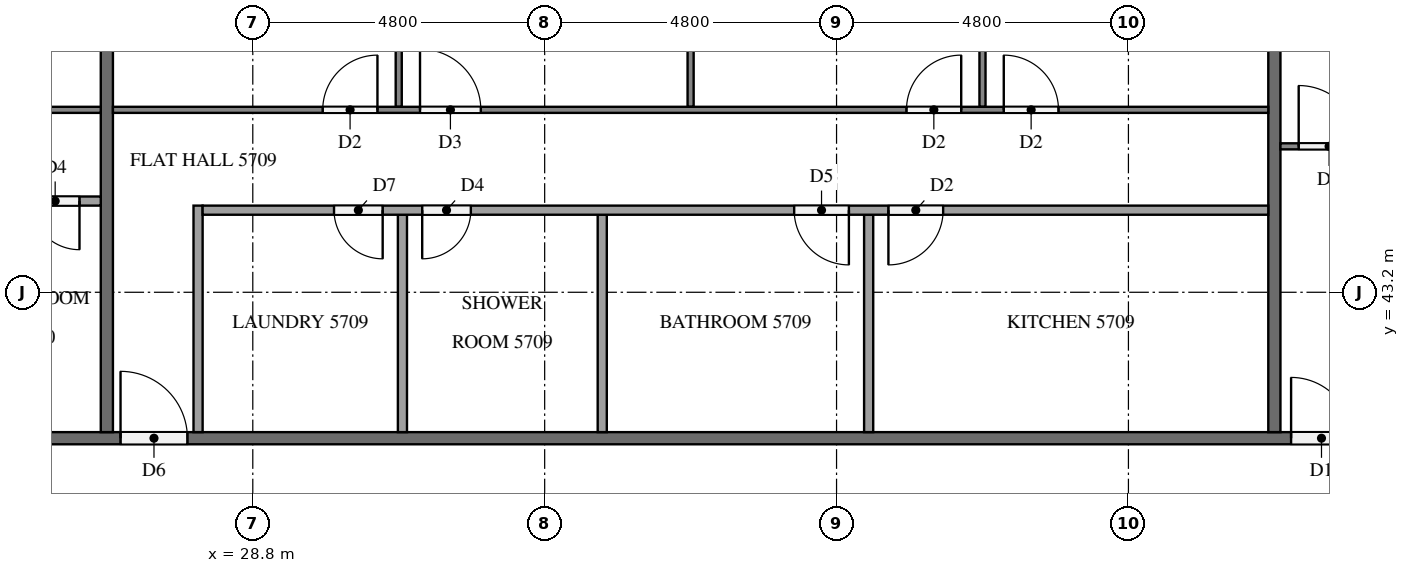
"""IFC4 building model, lengths in metres.
Left out: names, types, materials, properties, quantities, classifications, styles, units other than length and angle.
Written with IfcOpenShell. Run it as: python <this file> out.ifc"""

import sys

from ifc_helpers import new_model, si_unit, direction, frame, frame_2d, origin, place, context, subcontext, project, spatial, rectangle, extrude, element, fill, save


model = new_model("IFC4")
c1 = context("Model", 3, precision=1e-05, world=origin(), true_north=direction((0.0, 1.0)))
c2 = subcontext(c1, "Body", "Model", "MODEL_VIEW")
j1 = project(units=[si_unit("LENGTHUNIT", "METRE"), si_unit("PLANEANGLEUNIT", "RADIAN")], contexts=[c1])
p1 = place(None, origin())
s1 = spatial("IfcSite", under=j1, at=p1, CompositionType="ELEMENT")
p2 = place(p1, origin())
s2 = spatial("IfcBuilding", under=s1, at=p2, CompositionType="ELEMENT")
p3 = place(p2, frame((0.0, 0.0, 219.3)))
s3 = spatial("IfcBuildingStorey", under=s2, at=p3, CompositionType="ELEMENT", Elevation=219.3)
p4 = place(p3, frame((11.9, 40.8, 0.0), z_axis=(0.0, 0.0, 1.0), x_axis=(1.0, 0.0, 0.0)))
e1 = element("IfcWall", 1, at=p4, inside=s3, PredefinedType="PARTITIONING", context=c2, shape_type="SweptSolid", body=[
    extrude(rectangle(XDim=38.6, YDim=0.2, at=frame_2d((19.3, 0.0))), origin(), (0.0, 0.0, 1.0), 3.2),
])
p5 = place(p4, frame((33.975, 0.0, 0.0)))
e2 = element("IfcOpeningElement", 2, at=p5, cuts=e1, PredefinedType="OPENING", context=c2, shape_type="SweptSolid", body=[
    extrude(rectangle(XDim=1.0, YDim=2.1, at=frame_2d((0.5, 1.05))), frame((0.0, 0.11, 0.0), z_axis=(0.0, -1.0, 0.0), x_axis=(1.0, 0.0, 0.0)), (0.0, 0.0, 1.0), 0.22),
])
p6 = place(p4, frame((14.725, 0.0, 0.0)))
e3 = element("IfcOpeningElement", 3, at=p6, cuts=e1, PredefinedType="OPENING", context=c2, shape_type="SweptSolid", body=[
    extrude(rectangle(XDim=1.1, YDim=2.1, at=frame_2d((0.55, 1.05))), frame((0.0, 0.11, 0.0), z_axis=(0.0, -1.0, 0.0), x_axis=(1.0, 0.0, 0.0)), (0.0, 0.0, 1.0), 0.22),
])
p7 = place(p4, frame((7.575, 0.0, 0.0)))
e4 = element("IfcOpeningElement", 4, at=p7, cuts=e1, PredefinedType="OPENING", context=c2, shape_type="SweptSolid", body=[
    extrude(rectangle(XDim=1.0, YDim=2.1, at=frame_2d((0.5, 1.05))), frame((0.0, 0.11, 0.0), z_axis=(0.0, -1.0, 0.0), x_axis=(1.0, 0.0, 0.0)), (0.0, 0.0, 1.0), 0.22),
])
p8 = place(p4, frame((6.025, 0.0, 0.0)))
e5 = element("IfcOpeningElement", 5, at=p8, cuts=e1, PredefinedType="OPENING", context=c2, shape_type="SweptSolid", body=[
    extrude(rectangle(XDim=1.0, YDim=2.1, at=frame_2d((0.5, 1.05))), frame((0.0, 0.11, 0.0), z_axis=(0.0, -1.0, 0.0), x_axis=(1.0, 0.0, 0.0)), (0.0, 0.0, 1.0), 0.22),
])
for number, where, z_axis, x_axis in (
    (6, (45.6, 52.7, 0.0), (0.0, 0.0, 1.0), (0.0, -1.0, 0.0)),
    (7, (26.4, 52.7, 0.0), (0.0, 0.0, 1.0), (0.0, -1.0, 0.0)),
):
    element("IfcWall", number, at=place(p3, frame(where, z_axis=z_axis, x_axis=x_axis)), inside=s3, PredefinedType="PARTITIONING", context=c2, shape_type="SweptSolid", body=[
        extrude(rectangle(XDim=11.8, YDim=0.2, at=frame_2d((5.9, 0.0))), origin(), (0.0, 0.0, 1.0), 3.2),
    ])
p9 = place(p3, frame((45.7, 45.6, 0.0), z_axis=(0.0, 0.0, 1.0), x_axis=(1.0, 0.0, 0.0)))
e8 = element("IfcWall", 8, at=p9, inside=s3, PredefinedType="PARTITIONING", context=c2, shape_type="SweptSolid", body=[
    extrude(rectangle(XDim=16.6, YDim=0.1, at=frame_2d((8.3, 0.0))), origin(), (0.0, 0.0, 1.0), 3.2),
])
p10 = place(p9, frame((0.3, 0.0, 0.0)))
e9 = element("IfcOpeningElement", 9, at=p10, cuts=e8, PredefinedType="OPENING", context=c2, shape_type="SweptSolid", body=[
    extrude(rectangle(XDim=1.0, YDim=2.1, at=frame_2d((0.5, 1.05))), frame((0.0, 0.06, 0.0), z_axis=(0.0, -1.0, 0.0), x_axis=(1.0, 0.0, 0.0)), (0.0, 0.0, 1.0), 0.12),
])
p11 = place(p9, frame((10.65, 0.0, 0.0)))
e10 = element("IfcOpeningElement", 10, at=p11, cuts=e8, PredefinedType="OPENING", context=c2, shape_type="SweptSolid", body=[
    extrude(rectangle(XDim=0.9, YDim=2.1, at=frame_2d((0.45, 1.05))), frame((0.0, 0.06, 0.0), z_axis=(0.0, -1.0, 0.0), x_axis=(1.0, 0.0, 0.0)), (0.0, 0.0, 1.0), 0.12),
])
p12 = place(p9, frame((12.25, 0.0, 0.0)))
e11 = element("IfcOpeningElement", 11, at=p12, cuts=e8, PredefinedType="OPENING", context=c2, shape_type="SweptSolid", body=[
    extrude(rectangle(XDim=0.9, YDim=2.1, at=frame_2d((0.45, 1.05))), frame((0.0, 0.06, 0.0), z_axis=(0.0, -1.0, 0.0), x_axis=(1.0, 0.0, 0.0)), (0.0, 0.0, 1.0), 0.12),
])
for number, where, z_axis, x_axis in (
    (12, (31.2, 46.25, 0.0), (0.0, 0.0, 1.0), (0.0, 1.0, 0.0)),
    (13, (36.0, 46.25, 0.0), (0.0, 0.0, 1.0), (0.0, 1.0, 0.0)),
    (14, (40.8, 46.25, 0.0), (0.0, 0.0, 1.0), (0.0, 1.0, 0.0)),
):
    element("IfcWall", number, at=place(p3, frame(where, z_axis=z_axis, x_axis=x_axis)), inside=s3, PredefinedType="PARTITIONING", context=c2, shape_type="SweptSolid", body=[
        extrude(rectangle(XDim=6.45, YDim=0.1, at=frame_2d((3.225, 0.0))), origin(), (0.0, 0.0, 1.0), 3.2),
    ])
p13 = place(p3, frame((26.5, 46.2, 0.0), z_axis=(0.0, 0.0, 1.0), x_axis=(1.0, 0.0, 0.0)))
e15 = element("IfcWall", 15, at=p13, inside=s3, PredefinedType="PARTITIONING", context=c2, shape_type="SweptSolid", body=[
    extrude(rectangle(XDim=19.0, YDim=0.1, at=frame_2d((9.5, 0.0))), origin(), (0.0, 0.0, 1.0), 3.2),
])
p14 = place(p13, frame((3.45, 0.0, 0.0)))
e16 = element("IfcOpeningElement", 16, at=p14, cuts=e15, PredefinedType="OPENING", context=c2, shape_type="SweptSolid", body=[
    extrude(rectangle(XDim=0.9, YDim=2.1, at=frame_2d((0.45, 1.05))), frame((0.0, 0.06, 0.0), z_axis=(0.0, -1.0, 0.0), x_axis=(1.0, 0.0, 0.0)), (0.0, 0.0, 1.0), 0.12),
])
p15 = place(p13, frame((5.05, 0.0, 0.0)))
e17 = element("IfcOpeningElement", 17, at=p15, cuts=e15, PredefinedType="OPENING", context=c2, shape_type="SweptSolid", body=[
    extrude(rectangle(XDim=1.0, YDim=2.1, at=frame_2d((0.5, 1.05))), frame((0.0, 0.06, 0.0), z_axis=(0.0, -1.0, 0.0), x_axis=(1.0, 0.0, 0.0)), (0.0, 0.0, 1.0), 0.12),
])
p16 = place(p13, frame((13.05, 0.0, 0.0)))
e18 = element("IfcOpeningElement", 18, at=p16, cuts=e15, PredefinedType="OPENING", context=c2, shape_type="SweptSolid", body=[
    extrude(rectangle(XDim=0.9, YDim=2.1, at=frame_2d((0.45, 1.05))), frame((0.0, 0.06, 0.0), z_axis=(0.0, -1.0, 0.0), x_axis=(1.0, 0.0, 0.0)), (0.0, 0.0, 1.0), 0.12),
])
p17 = place(p13, frame((14.65, 0.0, 0.0)))
e19 = element("IfcOpeningElement", 19, at=p17, cuts=e15, PredefinedType="OPENING", context=c2, shape_type="SweptSolid", body=[
    extrude(rectangle(XDim=0.9, YDim=2.1, at=frame_2d((0.45, 1.05))), frame((0.0, 0.06, 0.0), z_axis=(0.0, -1.0, 0.0), x_axis=(1.0, 0.0, 0.0)), (0.0, 0.0, 1.0), 0.12),
])
for number, where, z_axis, x_axis in (
    (20, (31.261, 40.9, 0.0), (0.0, 0.0, 1.0), (0.0, 1.0, 0.0)),
    (21, (34.547, 40.9, 0.0), (0.0, 0.0, 1.0), (0.0, 1.0, 0.0)),
    (22, (38.928, 40.9, 0.0), (0.0, 0.0, 1.0), (0.0, 1.0, 0.0)),
):
    element("IfcWall", number, at=place(p3, frame(where, z_axis=z_axis, x_axis=x_axis)), inside=s3, PredefinedType="PARTITIONING", context=c2, shape_type="SweptSolid", body=[
        extrude(rectangle(XDim=3.575, YDim=0.15, at=frame_2d((1.788, 0.0))), origin(), (0.0, 0.0, 1.0), 3.2),
    ])
p18 = place(p3, frame((27.9, 40.9, 0.0), z_axis=(0.0, 0.0, 1.0), x_axis=(0.0, 1.0, 0.0)))
e23 = element("IfcWall", 23, at=p18, inside=s3, PredefinedType="PARTITIONING", context=c2, shape_type="SweptSolid", body=[
    extrude(rectangle(XDim=3.725, YDim=0.15, at=frame_2d((1.863, 0.0))), origin(), (0.0, 0.0, 1.0), 3.2),
])
p19 = place(p3, frame((45.5, 44.55, 0.0), z_axis=(0.0, 0.0, 1.0), x_axis=(-1.0, 0.0, 0.0)))
e24 = element("IfcWall", 24, at=p19, inside=s3, PredefinedType="PARTITIONING", context=c2, shape_type="SweptSolid", body=[
    extrude(rectangle(XDim=17.525, YDim=0.15, at=frame_2d((8.762, 0.0))), origin(), (0.0, 0.0, 1.0), 3.2),
])
p20 = place(p19, frame((14.564, 0.0, 0.0)))
e25 = element("IfcOpeningElement", 25, at=p20, cuts=e24, PredefinedType="OPENING", context=c2, shape_type="SweptSolid", body=[
    extrude(rectangle(XDim=0.8, YDim=2.1, at=frame_2d((0.4, 1.05))), frame((0.0, 0.085, 0.0), z_axis=(0.0, -1.0, 0.0), x_axis=(1.0, 0.0, 0.0)), (0.0, 0.0, 1.0), 0.17),
])
p21 = place(p19, frame((13.114, 0.0, 0.0)))
e26 = element("IfcOpeningElement", 26, at=p21, cuts=e24, PredefinedType="OPENING", context=c2, shape_type="SweptSolid", body=[
    extrude(rectangle(XDim=0.8, YDim=2.1, at=frame_2d((0.4, 1.05))), frame((0.0, 0.085, 0.0), z_axis=(0.0, -1.0, 0.0), x_axis=(1.0, 0.0, 0.0)), (0.0, 0.0, 1.0), 0.17),
])
p22 = place(p19, frame((6.897, 0.0, 0.0)))
e27 = element("IfcOpeningElement", 27, at=p22, cuts=e24, PredefinedType="OPENING", context=c2, shape_type="SweptSolid", body=[
    extrude(rectangle(XDim=0.9, YDim=2.1, at=frame_2d((0.45, 1.05))), frame((0.0, 0.085, 0.0), z_axis=(0.0, -1.0, 0.0), x_axis=(1.0, 0.0, 0.0)), (0.0, 0.0, 1.0), 0.17),
])
p23 = place(p19, frame((5.347, 0.0, 0.0)))
e28 = element("IfcOpeningElement", 28, at=p23, cuts=e24, PredefinedType="OPENING", context=c2, shape_type="SweptSolid", body=[
    extrude(rectangle(XDim=0.9, YDim=2.1, at=frame_2d((0.45, 1.05))), frame((0.0, 0.085, 0.0), z_axis=(0.0, -1.0, 0.0), x_axis=(1.0, 0.0, 0.0)), (0.0, 0.0, 1.0), 0.17),
])
p24 = place(p3, frame((19.3, 46.2, 0.0), z_axis=(0.0, 0.0, 1.0), x_axis=(1.0, 0.0, 0.0)))
e29 = element("IfcWall", 29, at=p24, inside=s3, PredefinedType="PARTITIONING", context=c2, shape_type="SweptSolid", body=[
    extrude(rectangle(XDim=7.0, YDim=0.1, at=frame_2d((3.5, 0.0))), origin(), (0.0, 0.0, 1.0), 3.2),
])
p25 = place(p24, frame((0.3, 0.0, 0.0)))
e30 = element("IfcOpeningElement", 30, at=p25, cuts=e29, PredefinedType="OPENING", context=c2, shape_type="SweptSolid", body=[
    extrude(rectangle(XDim=1.0, YDim=2.1, at=frame_2d((0.5, 1.05))), frame((0.0, 0.06, 0.0), z_axis=(0.0, -1.0, 0.0), x_axis=(1.0, 0.0, 0.0)), (0.0, 0.0, 1.0), 0.12),
])
p26 = place(p3, frame((26.3, 44.7, 0.0), z_axis=(0.0, 0.0, 1.0), x_axis=(-1.0, 0.0, 0.0)))
e31 = element("IfcWall", 31, at=p26, inside=s3, PredefinedType="PARTITIONING", context=c2, shape_type="SweptSolid", body=[
    extrude(rectangle(XDim=5.525, YDim=0.15, at=frame_2d((2.763, 0.0))), origin(), (0.0, 0.0, 1.0), 3.2),
])
p27 = place(p26, frame((4.325, 0.0, 0.0)))
e32 = element("IfcOpeningElement", 32, at=p27, cuts=e31, PredefinedType="OPENING", context=c2, shape_type="SweptSolid", body=[
    extrude(rectangle(XDim=0.9, YDim=2.1, at=frame_2d((0.45, 1.05))), frame((0.0, 0.085, 0.0), z_axis=(0.0, -1.0, 0.0), x_axis=(1.0, 0.0, 0.0)), (0.0, 0.0, 1.0), 0.17),
])
p28 = place(p26, frame((0.35, 0.0, 0.0)))
e33 = element("IfcOpeningElement", 33, at=p28, cuts=e31, PredefinedType="OPENING", context=c2, shape_type="SweptSolid", body=[
    extrude(rectangle(XDim=0.8, YDim=2.1, at=frame_2d((0.4, 1.05))), frame((0.0, 0.085, 0.0), z_axis=(0.0, -1.0, 0.0), x_axis=(1.0, 0.0, 0.0)), (0.0, 0.0, 1.0), 0.17),
])
p29 = place(p5, origin())
e34 = element("IfcDoor", 34, at=p29, inside=s3, OperationType="SINGLE_SWING_LEFT", PredefinedType="DOOR", context=c2, shape_type="SweptSolid", body=[
    extrude(rectangle(XDim=1.0, YDim=2.1, at=frame_2d((0.5, 1.05))), frame((0.0, 0.025, 0.0), z_axis=(0.0, -1.0, 0.0), x_axis=(1.0, 0.0, 0.0)), (0.0, 0.0, 1.0), 0.05),
])
fill(e2, e34)
p30 = place(p6, origin())
e35 = element("IfcDoor", 35, at=p30, inside=s3, OperationType="SINGLE_SWING_LEFT", PredefinedType="DOOR", context=c2, shape_type="SweptSolid", body=[
    extrude(rectangle(XDim=1.1, YDim=2.1, at=frame_2d((0.55, 1.05))), frame((0.0, 0.025, 0.0), z_axis=(0.0, -1.0, 0.0), x_axis=(1.0, 0.0, 0.0)), (0.0, 0.0, 1.0), 0.05),
])
fill(e3, e35)
p31 = place(p10, origin())
e36 = element("IfcDoor", 36, at=p31, inside=s3, OperationType="SINGLE_SWING_LEFT", PredefinedType="DOOR", context=c2, shape_type="SweptSolid", body=[
    extrude(rectangle(XDim=1.0, YDim=2.1, at=frame_2d((0.5, 1.05))), frame((0.0, 0.025, 0.0), z_axis=(0.0, -1.0, 0.0), x_axis=(1.0, 0.0, 0.0)), (0.0, 0.0, 1.0), 0.05),
])
fill(e9, e36)
p32 = place(p14, origin())
e37 = element("IfcDoor", 37, at=p32, inside=s3, OperationType="SINGLE_SWING_RIGHT", PredefinedType="DOOR", context=c2, shape_type="SweptSolid", body=[
    extrude(rectangle(XDim=0.9, YDim=2.1, at=frame_2d((0.45, 1.05))), frame((0.0, 0.025, 0.0), z_axis=(0.0, -1.0, 0.0), x_axis=(1.0, 0.0, 0.0)), (0.0, 0.0, 1.0), 0.05),
])
fill(e16, e37)
p33 = place(p15, origin())
e38 = element("IfcDoor", 38, at=p33, inside=s3, OperationType="SINGLE_SWING_LEFT", PredefinedType="DOOR", context=c2, shape_type="SweptSolid", body=[
    extrude(rectangle(XDim=1.0, YDim=2.1, at=frame_2d((0.5, 1.05))), frame((0.0, 0.025, 0.0), z_axis=(0.0, -1.0, 0.0), x_axis=(1.0, 0.0, 0.0)), (0.0, 0.0, 1.0), 0.05),
])
fill(e17, e38)
p34 = place(p16, origin())
e39 = element("IfcDoor", 39, at=p34, inside=s3, OperationType="SINGLE_SWING_RIGHT", PredefinedType="DOOR", context=c2, shape_type="SweptSolid", body=[
    extrude(rectangle(XDim=0.9, YDim=2.1, at=frame_2d((0.45, 1.05))), frame((0.0, 0.025, 0.0), z_axis=(0.0, -1.0, 0.0), x_axis=(1.0, 0.0, 0.0)), (0.0, 0.0, 1.0), 0.05),
])
fill(e18, e39)
p35 = place(p17, origin())
e40 = element("IfcDoor", 40, at=p35, inside=s3, OperationType="SINGLE_SWING_LEFT", PredefinedType="DOOR", context=c2, shape_type="SweptSolid", body=[
    extrude(rectangle(XDim=0.9, YDim=2.1, at=frame_2d((0.45, 1.05))), frame((0.0, 0.025, 0.0), z_axis=(0.0, -1.0, 0.0), x_axis=(1.0, 0.0, 0.0)), (0.0, 0.0, 1.0), 0.05),
])
fill(e19, e40)
p36 = place(p20, origin())
e41 = element("IfcDoor", 41, at=p36, inside=s3, OperationType="SINGLE_SWING_LEFT", PredefinedType="DOOR", context=c2, shape_type="SweptSolid", body=[
    extrude(rectangle(XDim=0.8, YDim=2.1, at=frame_2d((0.4, 1.05))), frame((0.0, 0.025, 0.0), z_axis=(0.0, -1.0, 0.0), x_axis=(1.0, 0.0, 0.0)), (0.0, 0.0, 1.0), 0.05),
])
fill(e25, e41)
p37 = place(p21, origin())
e42 = element("IfcDoor", 42, at=p37, inside=s3, OperationType="SINGLE_SWING_RIGHT", PredefinedType="DOOR", context=c2, shape_type="SweptSolid", body=[
    extrude(rectangle(XDim=0.8, YDim=2.1, at=frame_2d((0.4, 1.05))), frame((0.0, 0.025, 0.0), z_axis=(0.0, -1.0, 0.0), x_axis=(1.0, 0.0, 0.0)), (0.0, 0.0, 1.0), 0.05),
])
fill(e26, e42)
p38 = place(p22, origin())
e43 = element("IfcDoor", 43, at=p38, inside=s3, OperationType="SINGLE_SWING_LEFT", PredefinedType="DOOR", context=c2, shape_type="SweptSolid", body=[
    extrude(rectangle(XDim=0.9, YDim=2.1, at=frame_2d((0.45, 1.05))), frame((0.0, 0.025, 0.0), z_axis=(0.0, -1.0, 0.0), x_axis=(1.0, 0.0, 0.0)), (0.0, 0.0, 1.0), 0.05),
])
fill(e27, e43)
p39 = place(p23, origin())
e44 = element("IfcDoor", 44, at=p39, inside=s3, OperationType="SINGLE_SWING_RIGHT", PredefinedType="DOOR", context=c2, shape_type="SweptSolid", body=[
    extrude(rectangle(XDim=0.9, YDim=2.1, at=frame_2d((0.45, 1.05))), frame((0.0, 0.025, 0.0), z_axis=(0.0, -1.0, 0.0), x_axis=(1.0, 0.0, 0.0)), (0.0, 0.0, 1.0), 0.05),
])
fill(e28, e44)
p40 = place(p28, origin())
e45 = element("IfcDoor", 45, at=p40, inside=s3, OperationType="SINGLE_SWING_LEFT", PredefinedType="DOOR", context=c2, shape_type="SweptSolid", body=[
    extrude(rectangle(XDim=0.8, YDim=2.1, at=frame_2d((0.4, 1.05))), frame((0.0, 0.025, 0.0), z_axis=(0.0, -1.0, 0.0), x_axis=(1.0, 0.0, 0.0)), (0.0, 0.0, 1.0), 0.05),
])
fill(e33, e45)
save(model, sys.argv[1])
